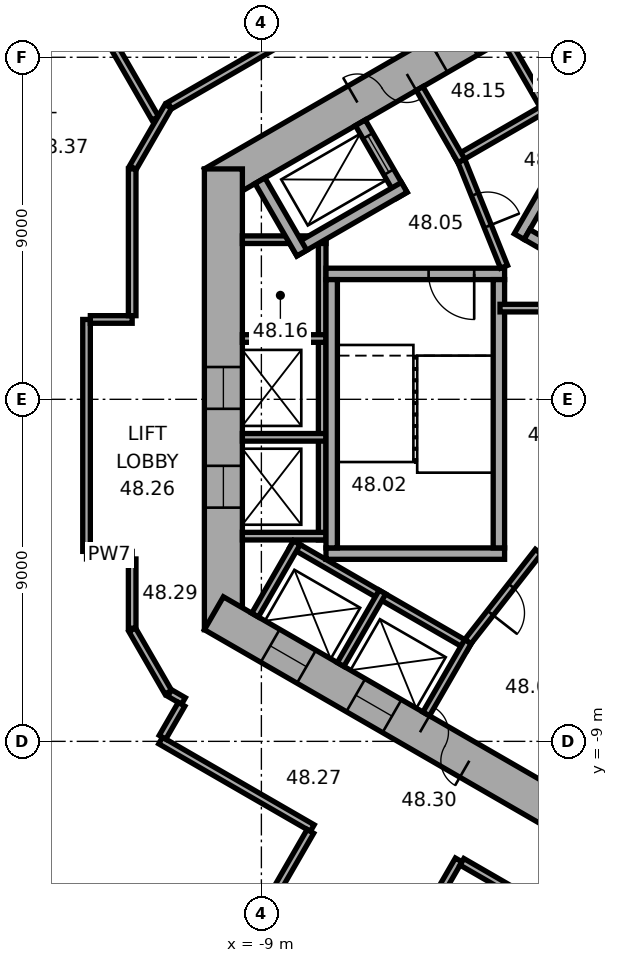
"""IFC4 building model, lengths in metres.
Left out: names, types, materials, properties, quantities, classifications, styles, units other than length and angle.
Written with IfcOpenShell. Run it as: python <this file> out.ifc"""

import sys

from ifc_helpers import new_model, si_unit, direction, frame, frame_2d, origin, place, context, subcontext, project, spatial, rectangle, extrude, element, fill, save


model = new_model("IFC4")
c1 = context("Model", 3, precision=1e-05, world=origin(), true_north=direction((0.0, 1.0)))
c2 = subcontext(c1, "Body", "Model", "MODEL_VIEW")
j1 = project(units=[si_unit("LENGTHUNIT", "METRE"), si_unit("PLANEANGLEUNIT", "RADIAN")], contexts=[c1])
p1 = place(None, origin())
s1 = spatial("IfcSite", under=j1, at=p1, CompositionType="ELEMENT")
p2 = place(p1, origin())
s2 = spatial("IfcBuilding", under=s1, at=p2, CompositionType="ELEMENT")
p3 = place(p2, frame((0.0, 0.0, 194.7)))
s3 = spatial("IfcBuildingStorey", under=s2, at=p3, CompositionType="ELEMENT", Elevation=194.7)
p4 = place(p3, frame((0.25, 11.691, 0.0), z_axis=(0.0, 0.0, 1.0), x_axis=(-0.866022616891, -0.50000482701, 0.0)))
e1 = element("IfcWall", 1, at=p4, inside=s3, PredefinedType="SHEAR", context=c2, shape_type="SweptSolid", body=[
    extrude(rectangle(XDim=12.125, YDim=1.0, at=frame_2d((6.062, 0.0))), origin(), (0.0, 0.0, 1.0), 3.7),
])
p5 = place(p4, frame((6.262, 0.0, 0.0)))
e2 = element("IfcOpeningElement", 2, at=p5, cuts=e1, PredefinedType="OPENING", context=c2, shape_type="SweptSolid", body=[
    extrude(rectangle(XDim=1.5, YDim=2.1, at=frame_2d((0.75, 1.05))), frame((0.0, 0.51, 0.0), z_axis=(0.0, -1.0, 0.0), x_axis=(1.0, 0.0, 0.0)), (0.0, 0.0, 1.0), 1.02),
])
p6 = place(p4, frame((1.812, 0.0, 0.0)))
e3 = element("IfcOpeningElement", 3, at=p6, cuts=e1, PredefinedType="OPENING", context=c2, shape_type="SweptSolid", body=[
    extrude(rectangle(XDim=0.9, YDim=2.1, at=frame_2d((0.45, 1.05))), frame((0.0, 0.51, 0.0), z_axis=(0.0, -1.0, 0.0), x_axis=(1.0, 0.0, 0.0)), (0.0, 0.0, 1.0), 1.02),
])
p7 = place(p4, frame((4.412, 0.0, 0.0)))
e4 = element("IfcOpeningElement", 4, at=p7, cuts=e1, PredefinedType="OPENING", context=c2, shape_type="SweptSolid", body=[
    extrude(rectangle(XDim=0.9, YDim=2.1, at=frame_2d((0.45, 1.05))), frame((0.0, 0.51, 0.0), z_axis=(0.0, -1.0, 0.0), x_axis=(1.0, 0.0, 0.0)), (0.0, 0.0, 1.0), 1.02),
])
p8 = place(p3, frame((-10.0, 6.062, 0.0), z_axis=(0.0, 0.0, 1.0), x_axis=(0.0, -1.0, 0.0)))
e5 = element("IfcWall", 5, at=p8, inside=s3, PredefinedType="SHEAR", context=c2, shape_type="SweptSolid", body=[
    extrude(rectangle(XDim=12.125, YDim=1.0, at=frame_2d((6.062, 0.0))), origin(), (0.0, 0.0, 1.0), 3.7),
])
p9 = place(p8, frame((5.212, 0.0, 0.0)))
e6 = element("IfcOpeningElement", 6, at=p9, cuts=e5, PredefinedType="OPENING", context=c2, shape_type="SweptSolid", body=[
    extrude(rectangle(XDim=1.1, YDim=2.1, at=frame_2d((0.55, 1.05))), frame((0.0, 0.51, 0.0), z_axis=(0.0, -1.0, 0.0), x_axis=(1.0, 0.0, 0.0)), (0.0, 0.0, 1.0), 1.02),
])
p10 = place(p8, frame((7.812, 0.0, 0.0)))
e7 = element("IfcOpeningElement", 7, at=p10, cuts=e5, PredefinedType="OPENING", context=c2, shape_type="SweptSolid", body=[
    extrude(rectangle(XDim=1.1, YDim=2.1, at=frame_2d((0.55, 1.05))), frame((0.0, 0.51, 0.0), z_axis=(0.0, -1.0, 0.0), x_axis=(1.0, 0.0, 0.0)), (0.0, 0.0, 1.0), 1.02),
])
p11 = place(p3, frame((-10.25, -5.629, 0.0), z_axis=(0.0, 0.0, 1.0), x_axis=(0.866022616891, -0.50000482701, 0.0)))
e8 = element("IfcWall", 8, at=p11, inside=s3, PredefinedType="SHEAR", context=c2, shape_type="SweptSolid", body=[
    extrude(rectangle(XDim=12.125, YDim=1.0, at=frame_2d((6.062, 0.0))), origin(), (0.0, 0.0, 1.0), 3.7),
])
p12 = place(p11, frame((6.262, 0.0, 0.0)))
e9 = element("IfcOpeningElement", 9, at=p12, cuts=e8, PredefinedType="OPENING", context=c2, shape_type="SweptSolid", body=[
    extrude(rectangle(XDim=1.5, YDim=2.1, at=frame_2d((0.75, 1.05))), frame((0.0, 0.51, 0.0), z_axis=(0.0, -1.0, 0.0), x_axis=(1.0, 0.0, 0.0)), (0.0, 0.0, 1.0), 1.02),
])
p13 = place(p11, frame((1.712, 0.0, 0.0)))
e10 = element("IfcOpeningElement", 10, at=p13, cuts=e8, PredefinedType="OPENING", context=c2, shape_type="SweptSolid", body=[
    extrude(rectangle(XDim=1.1, YDim=2.1, at=frame_2d((0.55, 1.05))), frame((0.0, 0.51, 0.0), z_axis=(0.0, -1.0, 0.0), x_axis=(1.0, 0.0, 0.0)), (0.0, 0.0, 1.0), 1.02),
])
p14 = place(p11, frame((4.312, 0.0, 0.0)))
e11 = element("IfcOpeningElement", 11, at=p14, cuts=e8, PredefinedType="OPENING", context=c2, shape_type="SweptSolid", body=[
    extrude(rectangle(XDim=1.1, YDim=2.1, at=frame_2d((0.55, 1.05))), frame((0.0, 0.51, 0.0), z_axis=(0.0, -1.0, 0.0), x_axis=(1.0, 0.0, 0.0)), (0.0, 0.0, 1.0), 1.02),
])
p15 = place(p3, frame((0.803, 9.009, 0.0), z_axis=(0.0, 0.0, 1.0), x_axis=(-0.866028230842, -0.499995103361, 0.0)))
e12 = element("IfcWall", 12, at=p15, inside=s3, PredefinedType="PARTITIONING", context=c2, shape_type="SweptSolid", body=[
    extrude(rectangle(XDim=5.4, YDim=0.2, at=frame_2d((2.7, 0.0))), origin(), (0.0, 0.0, 1.0), 3.42),
])
for number, where, z_axis, x_axis in (
    (13, (-1.485, 7.572, 0.0), (0.0, 0.0, 1.0), (-0.5, 0.866, 0.0)),
    (14, (-3.737, 6.272, 0.0), (0.0, 0.0, 1.0), (-0.5, 0.866, 0.0)),
):
    element("IfcWall", number, at=place(p3, frame(where, z_axis=z_axis, x_axis=x_axis)), inside=s3, PredefinedType="PARTITIONING", context=c2, shape_type="SweptSolid", body=[
        extrude(rectangle(XDim=2.2, YDim=0.2, at=frame_2d((1.1, 0.0))), origin(), (0.0, 0.0, 1.0), 3.42),
    ])
p16 = place(p3, frame((-7.4, 4.3, 0.0), z_axis=(0.0, 0.0, 1.0), x_axis=(0.0, -1.0, 0.0)))
e15 = element("IfcWall", 15, at=p16, inside=s3, PredefinedType="PARTITIONING", context=c2, shape_type="SweptSolid", body=[
    extrude(rectangle(XDim=8.0, YDim=0.2, at=frame_2d((4.0, 0.0))), origin(), (0.0, 0.0, 1.0), 3.42),
])
for number, where, z_axis, x_axis in (
    (16, (-7.3, 4.2, 0.0), (0.0, 0.0, 1.0), (-1.0, 0.0, 0.0)),
    (17, (-7.3, 1.6, 0.0), (0.0, 0.0, 1.0), (-1.0, 0.0, 0.0)),
    (18, (-7.3, -1.0, 0.0), (0.0, 0.0, 1.0), (-1.0, 0.0, 0.0)),
    (19, (-7.3, -3.6, 0.0), (0.0, 0.0, 1.0), (-1.0, 0.0, 0.0)),
):
    element("IfcWall", number, at=place(p3, frame(where, z_axis=z_axis, x_axis=x_axis)), inside=s3, PredefinedType="PARTITIONING", context=c2, shape_type="SweptSolid", body=[
        extrude(rectangle(XDim=2.2, YDim=0.2, at=frame_2d((1.1, 0.0))), origin(), (0.0, 0.0, 1.0), 3.42),
    ])
p17 = place(p3, frame((-8.203, -3.809, 0.0), z_axis=(0.0, 0.0, 1.0), x_axis=(0.866028230842, -0.499995103361, 0.0)))
e20 = element("IfcWall", 20, at=p17, inside=s3, PredefinedType="PARTITIONING", context=c2, shape_type="SweptSolid", body=[
    extrude(rectangle(XDim=5.4, YDim=0.2, at=frame_2d((2.7, 0.0))), origin(), (0.0, 0.0, 1.0), 3.42),
])
for number, where, z_axis, x_axis in (
    (21, (-8.067, -3.772, 0.0), (0.0, 0.0, 1.0), (-0.5, -0.866, 0.0)),
    (22, (-5.815, -5.072, 0.0), (0.0, 0.0, 1.0), (-0.5, -0.866, 0.0)),
):
    element("IfcWall", number, at=place(p3, frame(where, z_axis=z_axis, x_axis=x_axis)), inside=s3, PredefinedType="PARTITIONING", context=c2, shape_type="SweptSolid", body=[
        extrude(rectangle(XDim=2.2, YDim=0.2, at=frame_2d((1.1, 0.0))), origin(), (0.0, 0.0, 1.0), 3.42),
    ])
p18 = place(p3, frame((-3.563, -6.372, 0.0), z_axis=(0.0, 0.0, 1.0), x_axis=(-0.499994660107, -0.866028486751, 0.0)))
e23 = element("IfcWall", 23, at=p18, inside=s3, PredefinedType="PARTITIONING", context=c2, shape_type="SweptSolid", body=[
    extrude(rectangle(XDim=2.2, YDim=0.2, at=frame_2d((1.1, 0.0))), origin(), (0.0, 0.0, 1.0), 3.42),
])
p19 = place(p3, frame((-2.216, 4.282, 0.0), z_axis=(0.0, 0.0, 1.0), x_axis=(0.499977259774, 0.866038532462, 0.0)))
e24 = element("IfcWall", 24, at=p19, inside=s3, PredefinedType="SHEAR", context=c2, shape_type="SweptSolid", body=[
    extrude(rectangle(XDim=4.7, YDim=0.3, at=frame_2d((2.35, 0.0))), origin(), (0.0, 0.0, 1.0), 3.42),
])
p20 = place(p3, frame((4.103, 0.807, 0.0), z_axis=(0.0, 0.0, 1.0), x_axis=(-0.866027801685, 0.499995846692, 0.0)))
e25 = element("IfcWall", 25, at=p20, inside=s3, PredefinedType="SHEAR", context=c2, shape_type="SweptSolid", body=[
    extrude(rectangle(XDim=7.06, YDim=0.3, at=frame_2d((3.53, 0.0))), origin(), (0.0, 0.0, 1.0), 3.42),
])
p21 = place(p3, frame((-2.6, 3.3, 0.0), z_axis=(0.0, 0.0, 1.0), x_axis=(-1.0, 0.0, 0.0)))
e26 = element("IfcWall", 26, at=p21, inside=s3, PredefinedType="SHEAR", context=c2, shape_type="SweptSolid", body=[
    extrude(rectangle(XDim=4.7, YDim=0.3, at=frame_2d((2.35, 0.0))), origin(), (0.0, 0.0, 1.0), 3.42),
])
p22 = place(p21, frame((0.8, 0.0, 0.0)))
e27 = element("IfcOpeningElement", 27, at=p22, cuts=e26, PredefinedType="OPENING", context=c2, shape_type="SweptSolid", body=[
    extrude(rectangle(XDim=1.2, YDim=2.1, at=frame_2d((0.6, 1.05))), frame((0.0, 0.16, 0.0), z_axis=(0.0, -1.0, 0.0), x_axis=(1.0, 0.0, 0.0)), (0.0, 0.0, 1.0), 0.32),
])
p23 = place(p3, frame((-2.6, -4.06, 0.0), z_axis=(0.0, 0.0, 1.0), x_axis=(-1.0, 0.0, 0.0)))
e28 = element("IfcWall", 28, at=p23, inside=s3, PredefinedType="SHEAR", context=c2, shape_type="SweptSolid", body=[
    extrude(rectangle(XDim=4.7, YDim=0.3, at=frame_2d((2.35, 0.0))), origin(), (0.0, 0.0, 1.0), 3.42),
])
for number, where, z_axis, x_axis in (
    (29, (-2.75, 3.15, 0.0), (0.0, 0.0, 1.0), (0.0, -1.0, 0.0)),
    (30, (-7.15, 3.15, 0.0), (0.0, 0.0, 1.0), (0.0, -1.0, 0.0)),
):
    element("IfcWall", number, at=place(p3, frame(where, z_axis=z_axis, x_axis=x_axis)), inside=s3, PredefinedType="SHEAR", context=c2, shape_type="SweptSolid", body=[
        extrude(rectangle(XDim=7.06, YDim=0.3, at=frame_2d((3.53, 0.0))), origin(), (0.0, 0.0, 1.0), 3.42),
    ])
p24 = place(p3, frame((-5.295, 5.372, 0.0), z_axis=(0.0, 0.0, 1.0), x_axis=(-0.500077893725, 0.86598042715, 0.0)))
e31 = element("IfcWall", 31, at=p24, inside=s3, PredefinedType="SHEAR", context=c2, shape_type="SweptSolid", body=[
    extrude(rectangle(XDim=2.2, YDim=0.3, at=frame_2d((1.1, 0.0))), origin(), (0.0, 0.0, 1.0), 3.42),
])
p25 = place(p24, frame((0.7, 0.0, 0.0)))
e32 = element("IfcOpeningElement", 32, at=p25, cuts=e31, PredefinedType="OPENING", context=c2, shape_type="SweptSolid", body=[
    extrude(rectangle(XDim=1.1, YDim=2.1, at=frame_2d((0.55, 1.05))), frame((0.0, 0.16, 0.0), z_axis=(0.0, -1.0, 0.0), x_axis=(1.0, 0.0, 0.0)), (0.0, 0.0, 1.0), 0.32),
])
p26 = place(p3, frame((-5.24, 5.577, 0.0), z_axis=(0.0, 0.0, 1.0), x_axis=(-0.866014461049, -0.500018952895, 0.0)))
e33 = element("IfcWall", 33, at=p26, inside=s3, PredefinedType="SHEAR", context=c2, shape_type="SweptSolid", body=[
    extrude(rectangle(XDim=3.35, YDim=0.3, at=frame_2d((1.675, 0.0))), origin(), (0.0, 0.0, 1.0), 3.42),
])
p27 = place(p3, frame((-7.937, 3.847, 0.0), z_axis=(0.0, 0.0, 1.0), x_axis=(-0.50002983664, 0.866008176907, 0.0)))
e34 = element("IfcWall", 34, at=p27, inside=s3, PredefinedType="SHEAR", context=c2, shape_type="SweptSolid", body=[
    extrude(rectangle(XDim=2.2, YDim=0.3, at=frame_2d((1.1, 0.0))), origin(), (0.0, 0.0, 1.0), 3.42),
])
p28 = place(p3, frame((-2.615, 3.487, 0.0), z_axis=(0.0, 0.0, 1.0), x_axis=(-0.373576831041, 0.92759924068, 0.0)))
e35 = element("IfcWall", 35, at=p28, inside=s3, PredefinedType="PARTITIONING", context=c2, shape_type="SweptSolid", body=[
    extrude(rectangle(XDim=3.002, YDim=0.2, at=frame_2d((1.501, 0.0))), origin(), (0.0, 0.0, 1.0), 3.42),
])
p29 = place(p28, frame((1.15, 0.0, 0.0)))
e36 = element("IfcOpeningElement", 36, at=p29, cuts=e35, PredefinedType="OPENING", context=c2, shape_type="SweptSolid", body=[
    extrude(rectangle(XDim=0.9, YDim=2.1, at=frame_2d((0.45, 1.05))), frame((0.0, 0.11, 0.0), z_axis=(0.0, -1.0, 0.0), x_axis=(1.0, 0.0, 0.0)), (0.0, 0.0, 1.0), 0.22),
])
p30 = place(p3, frame((-1.712, -4.008, 0.0), z_axis=(0.0, 0.0, 1.0), x_axis=(-0.616549420702, -0.787316208287, 0.0)))
e37 = element("IfcWall", 37, at=p30, inside=s3, PredefinedType="PARTITIONING", context=c2, shape_type="SweptSolid", body=[
    extrude(rectangle(XDim=3.002, YDim=0.2, at=frame_2d((1.501, 0.0))), origin(), (0.0, 0.0, 1.0), 3.42),
])
p31 = place(p30, frame((1.15, 0.0, 0.0)))
e38 = element("IfcOpeningElement", 38, at=p31, cuts=e37, PredefinedType="OPENING", context=c2, shape_type="SweptSolid", body=[
    extrude(rectangle(XDim=0.9, YDim=2.1, at=frame_2d((0.45, 1.05))), frame((0.0, 0.11, 0.0), z_axis=(0.0, -1.0, 0.0), x_axis=(1.0, 0.0, 0.0)), (0.0, 0.0, 1.0), 0.22),
])
p32 = place(p3, frame((-2.72, 2.4, 0.0), z_axis=(0.0, 0.0, 1.0), x_axis=(1.0, 0.0, 0.0)))
e39 = element("IfcWall", 39, at=p32, inside=s3, PredefinedType="PARTITIONING", context=c2, shape_type="SweptSolid", body=[
    extrude(rectangle(XDim=3.883, YDim=0.2, at=frame_2d((1.941, 0.0))), origin(), (0.0, 0.0, 1.0), 3.42),
])
p33 = place(p3, frame((-16.018, 14.712, 0.0), z_axis=(0.0, 0.0, 1.0), x_axis=(0.500000843414, -0.866024916838, 0.0)))
e40 = element("IfcWall", 40, at=p33, inside=s3, PredefinedType="PARTITIONING", context=c2, shape_type="SweptSolid", body=[
    extrude(rectangle(XDim=8.452, YDim=0.2, at=frame_2d((4.226, 0.0))), origin(), (0.0, 0.0, 1.0), 3.42),
])
p34 = place(p3, frame((-13.601, -4.101, 0.0), z_axis=(0.0, 0.0, 1.0), x_axis=(1.0, 0.0, 0.0)))
e41 = element("IfcWall", 41, at=p34, inside=s3, PredefinedType="PARTITIONING", context=c2, shape_type="SweptSolid", body=[
    extrude(rectangle(XDim=1.201, YDim=0.2, at=frame_2d((0.601, 0.0))), origin(), (0.0, 0.0, 1.0), 3.42),
])
p35 = place(p3, frame((-13.601, 2.101, 0.0), z_axis=(0.0, 0.0, 1.0), x_axis=(0.0, -1.0, 0.0)))
e42 = element("IfcWall", 42, at=p35, inside=s3, PredefinedType="PARTITIONING", context=c2, shape_type="SweptSolid", body=[
    extrude(rectangle(XDim=6.102, YDim=0.2, at=frame_2d((3.051, 0.0))), origin(), (0.0, 0.0, 1.0), 3.42),
])
p36 = place(p3, frame((-12.4, -6.062, 0.0), z_axis=(0.0, 0.0, 1.0), x_axis=(0.500022797313, -0.86601224135, 0.0)))
e43 = element("IfcWall", 43, at=p36, inside=s3, PredefinedType="PARTITIONING", context=c2, shape_type="SweptSolid", body=[
    extrude(rectangle(XDim=1.9, YDim=0.2, at=frame_2d((0.95, 0.0))), origin(), (0.0, 0.0, 1.0), 3.42),
])
p37 = place(p3, frame((-12.4, -4.201, 0.0), z_axis=(0.0, 0.0, 1.0), x_axis=(0.0, -1.0, 0.0)))
e44 = element("IfcWall", 44, at=p37, inside=s3, PredefinedType="PARTITIONING", context=c2, shape_type="SweptSolid", body=[
    extrude(rectangle(XDim=1.821, YDim=0.2, at=frame_2d((0.911, 0.0))), origin(), (0.0, 0.0, 1.0), 3.42),
])
p38 = place(p3, frame((-12.4, 2.101, 0.0), z_axis=(0.0, 0.0, 1.0), x_axis=(-1.0, 0.0, 0.0)))
e45 = element("IfcWall", 45, at=p38, inside=s3, PredefinedType="PARTITIONING", context=c2, shape_type="SweptSolid", body=[
    extrude(rectangle(XDim=1.101, YDim=0.2, at=frame_2d((0.551, 0.0))), origin(), (0.0, 0.0, 1.0), 3.42),
])
p39 = place(p3, frame((-12.4, 6.062, 0.0), z_axis=(0.0, 0.0, 1.0), x_axis=(0.0, -1.0, 0.0)))
e46 = element("IfcWall", 46, at=p39, inside=s3, PredefinedType="PARTITIONING", context=c2, shape_type="SweptSolid", body=[
    extrude(rectangle(XDim=3.861, YDim=0.2, at=frame_2d((1.931, 0.0))), origin(), (0.0, 0.0, 1.0), 3.42),
])
p40 = place(p3, frame((-11.651, -8.978, 0.0), z_axis=(0.0, 0.0, 1.0), x_axis=(0.866010893236, -0.500025132165, 0.0)))
e47 = element("IfcWall", 47, at=p40, inside=s3, PredefinedType="PARTITIONING", context=c2, shape_type="SweptSolid", body=[
    extrude(rectangle(XDim=4.608, YDim=0.2, at=frame_2d((2.304, 0.0))), origin(), (0.0, 0.0, 1.0), 3.42),
])
p41 = place(p3, frame((-11.45, 7.708, 0.0), z_axis=(0.0, 0.0, 1.0), x_axis=(-0.499964847546, -0.866045698112, 0.0)))
e48 = element("IfcWall", 48, at=p41, inside=s3, PredefinedType="PARTITIONING", context=c2, shape_type="SweptSolid", body=[
    extrude(rectangle(XDim=1.86, YDim=0.2, at=frame_2d((0.93, 0.0))), origin(), (0.0, 0.0, 1.0), 3.42),
])
p42 = place(p3, frame((-11.415, -7.728, 0.0), z_axis=(0.0, 0.0, 1.0), x_axis=(0.865915281873, -0.500190688257, 0.0)))
e49 = element("IfcWall", 49, at=p42, inside=s3, PredefinedType="PARTITIONING", context=c2, shape_type="SweptSolid", body=[
    extrude(rectangle(XDim=0.421, YDim=0.2, at=frame_2d((0.21, 0.0))), origin(), (0.0, 0.0, 1.0), 3.42),
])
p43 = place(p3, frame((-11.235, -17.474, 0.0), z_axis=(0.0, 0.0, 1.0), x_axis=(0.500009260695, 0.866020057054, 0.0)))
e50 = element("IfcWall", 50, at=p43, inside=s3, PredefinedType="PARTITIONING", context=c2, shape_type="SweptSolid", body=[
    extrude(rectangle(XDim=7.049, YDim=0.2, at=frame_2d((3.524, 0.0))), origin(), (0.0, 0.0, 1.0), 2.87),
])
p44 = place(p43, frame((3.024, 0.0, 0.0)))
e51 = element("IfcOpeningElement", 51, at=p44, cuts=e50, PredefinedType="OPENING", context=c2, shape_type="SweptSolid", body=[
    extrude(rectangle(XDim=1.0, YDim=2.1, at=frame_2d((0.5, 1.05))), frame((0.0, 0.11, 0.0), z_axis=(0.0, -1.0, 0.0), x_axis=(1.0, 0.0, 0.0)), (0.0, 0.0, 1.0), 0.22),
])
p45 = place(p3, frame((-11.101, -8.025, 0.0), z_axis=(0.0, 0.0, 1.0), x_axis=(-0.500074377092, -0.865982457891, 0.0)))
e52 = element("IfcWall", 52, at=p45, inside=s3, PredefinedType="PARTITIONING", context=c2, shape_type="SweptSolid", body=[
    extrude(rectangle(XDim=1.001, YDim=0.2, at=frame_2d((0.5, 0.0))), origin(), (0.0, 0.0, 1.0), 3.42),
])
p46 = place(p3, frame((-8.678, 9.308, 0.0), z_axis=(0.0, 0.0, 1.0), x_axis=(-0.866000359435, -0.500043375578, 0.0)))
e53 = element("IfcWall", 53, at=p46, inside=s3, PredefinedType="PARTITIONING", context=c2, shape_type="SweptSolid", body=[
    extrude(rectangle(XDim=3.161, YDim=0.2, at=frame_2d((1.581, 0.0))), origin(), (0.0, 0.0, 1.0), 3.42),
])
p47 = place(p3, frame((-7.984, -19.351, 0.0), z_axis=(0.0, 0.0, 1.0), x_axis=(0.500010139422, 0.866019549707, 0.0)))
e54 = element("IfcWall", 54, at=p47, inside=s3, PredefinedType="PARTITIONING", context=c2, shape_type="SweptSolid", body=[
    extrude(rectangle(XDim=8.35, YDim=0.2, at=frame_2d((4.175, 0.0))), origin(), (0.0, 0.0, 1.0), 3.42),
])
p48 = place(p47, frame((3.675, 0.0, 0.0)))
e55 = element("IfcOpeningElement", 55, at=p48, cuts=e54, PredefinedType="OPENING", context=c2, shape_type="SweptSolid", body=[
    extrude(rectangle(XDim=1.0, YDim=2.1, at=frame_2d((0.5, 1.05))), frame((0.0, 0.11, 0.0), z_axis=(0.0, -1.0, 0.0), x_axis=(1.0, 0.0, 0.0)), (0.0, 0.0, 1.0), 0.22),
])
p49 = place(p3, frame((-3.722, -12.169, 0.0), z_axis=(0.0, 0.0, 1.0), x_axis=(0.866033163891, -0.499986558861, 0.0)))
e56 = element("IfcWall", 56, at=p49, inside=s3, PredefinedType="PARTITIONING", context=c2, shape_type="SweptSolid", body=[
    extrude(rectangle(XDim=3.201, YDim=0.2, at=frame_2d((1.6, 0.0))), origin(), (0.0, 0.0, 1.0), 3.42),
])
p50 = place(p5, origin())
e57 = element("IfcDoor", 57, at=p50, inside=s3, OperationType="DOUBLE_DOOR_SINGLE_SWING", PredefinedType="DOOR", context=c2, shape_type="SweptSolid", body=[
    extrude(rectangle(XDim=1.5, YDim=2.1, at=frame_2d((0.75, 1.05))), frame((0.0, 0.025, 0.0), z_axis=(0.0, -1.0, 0.0), x_axis=(1.0, 0.0, 0.0)), (0.0, 0.0, 1.0), 0.05),
])
fill(e2, e57)
p51 = place(p12, origin())
e58 = element("IfcDoor", 58, at=p51, inside=s3, OperationType="DOUBLE_DOOR_SINGLE_SWING", PredefinedType="DOOR", context=c2, shape_type="SweptSolid", body=[
    extrude(rectangle(XDim=1.5, YDim=2.1, at=frame_2d((0.75, 1.05))), frame((0.0, 0.025, 0.0), z_axis=(0.0, -1.0, 0.0), x_axis=(1.0, 0.0, 0.0)), (0.0, 0.0, 1.0), 0.05),
])
fill(e9, e58)
p52 = place(p22, origin())
e59 = element("IfcDoor", 59, at=p52, inside=s3, OperationType="SINGLE_SWING_RIGHT", PredefinedType="DOOR", context=c2, shape_type="SweptSolid", body=[
    extrude(rectangle(XDim=1.2, YDim=2.1, at=frame_2d((0.6, 1.05))), frame((0.0, 0.025, 0.0), z_axis=(0.0, -1.0, 0.0), x_axis=(1.0, 0.0, 0.0)), (0.0, 0.0, 1.0), 0.05),
])
fill(e27, e59)
p53 = place(p29, origin())
e60 = element("IfcDoor", 60, at=p53, inside=s3, OperationType="SINGLE_SWING_LEFT", PredefinedType="DOOR", context=c2, shape_type="SweptSolid", body=[
    extrude(rectangle(XDim=0.9, YDim=2.1, at=frame_2d((0.45, 1.05))), frame((0.0, 0.025, 0.0), z_axis=(0.0, -1.0, 0.0), x_axis=(1.0, 0.0, 0.0)), (0.0, 0.0, 1.0), 0.05),
])
fill(e36, e60)
p54 = place(p31, origin())
e61 = element("IfcDoor", 61, at=p54, inside=s3, OperationType="SINGLE_SWING_LEFT", PredefinedType="DOOR", context=c2, shape_type="SweptSolid", body=[
    extrude(rectangle(XDim=0.9, YDim=2.1, at=frame_2d((0.45, 1.05))), frame((0.0, 0.025, 0.0), z_axis=(0.0, -1.0, 0.0), x_axis=(1.0, 0.0, 0.0)), (0.0, 0.0, 1.0), 0.05),
])
fill(e38, e61)
p55 = place(p7, origin())
e62 = element("IfcDoor", 62, at=p55, inside=s3, OperationType="SINGLE_SWING_LEFT", PredefinedType="DOOR", context=c2, shape_type="SweptSolid", body=[
    extrude(rectangle(XDim=0.9, YDim=2.1, at=frame_2d((0.45, 1.05))), frame((0.0, 0.025, 0.0), z_axis=(0.0, -1.0, 0.0), x_axis=(1.0, 0.0, 0.0)), (0.0, 0.0, 1.0), 0.05),
])
fill(e4, e62)
p56 = place(p25, origin())
e63 = element("IfcDoor", 63, at=p56, inside=s3, OperationType="DOUBLE_DOOR_SLIDING", PredefinedType="DOOR", context=c2, shape_type="SweptSolid", body=[
    extrude(rectangle(XDim=1.1, YDim=2.1, at=frame_2d((0.55, 1.05))), frame((0.0, 0.025, 0.0), z_axis=(0.0, -1.0, 0.0), x_axis=(1.0, 0.0, 0.0)), (0.0, 0.0, 1.0), 0.05),
])
fill(e32, e63)
p57 = place(p9, origin())
e64 = element("IfcDoor", 64, at=p57, inside=s3, OperationType="DOUBLE_DOOR_SLIDING", PredefinedType="DOOR", context=c2, shape_type="SweptSolid", body=[
    extrude(rectangle(XDim=1.1, YDim=2.1, at=frame_2d((0.55, 1.05))), frame((0.0, 0.025, 0.0), z_axis=(0.0, -1.0, 0.0), x_axis=(1.0, 0.0, 0.0)), (0.0, 0.0, 1.0), 0.05),
])
fill(e6, e64)
p58 = place(p10, origin())
e65 = element("IfcDoor", 65, at=p58, inside=s3, OperationType="DOUBLE_DOOR_SLIDING", PredefinedType="DOOR", context=c2, shape_type="SweptSolid", body=[
    extrude(rectangle(XDim=1.1, YDim=2.1, at=frame_2d((0.55, 1.05))), frame((0.0, 0.025, 0.0), z_axis=(0.0, -1.0, 0.0), x_axis=(1.0, 0.0, 0.0)), (0.0, 0.0, 1.0), 0.05),
])
fill(e7, e65)
p59 = place(p13, origin())
e66 = element("IfcDoor", 66, at=p59, inside=s3, OperationType="DOUBLE_DOOR_SLIDING", PredefinedType="DOOR", context=c2, shape_type="SweptSolid", body=[
    extrude(rectangle(XDim=1.1, YDim=2.1, at=frame_2d((0.55, 1.05))), frame((0.0, 0.025, 0.0), z_axis=(0.0, -1.0, 0.0), x_axis=(1.0, 0.0, 0.0)), (0.0, 0.0, 1.0), 0.05),
])
fill(e10, e66)
p60 = place(p14, origin())
e67 = element("IfcDoor", 67, at=p60, inside=s3, OperationType="DOUBLE_DOOR_SLIDING", PredefinedType="DOOR", context=c2, shape_type="SweptSolid", body=[
    extrude(rectangle(XDim=1.1, YDim=2.1, at=frame_2d((0.55, 1.05))), frame((0.0, 0.025, 0.0), z_axis=(0.0, -1.0, 0.0), x_axis=(1.0, 0.0, 0.0)), (0.0, 0.0, 1.0), 0.05),
])
fill(e11, e67)
save(model, sys.argv[1])
